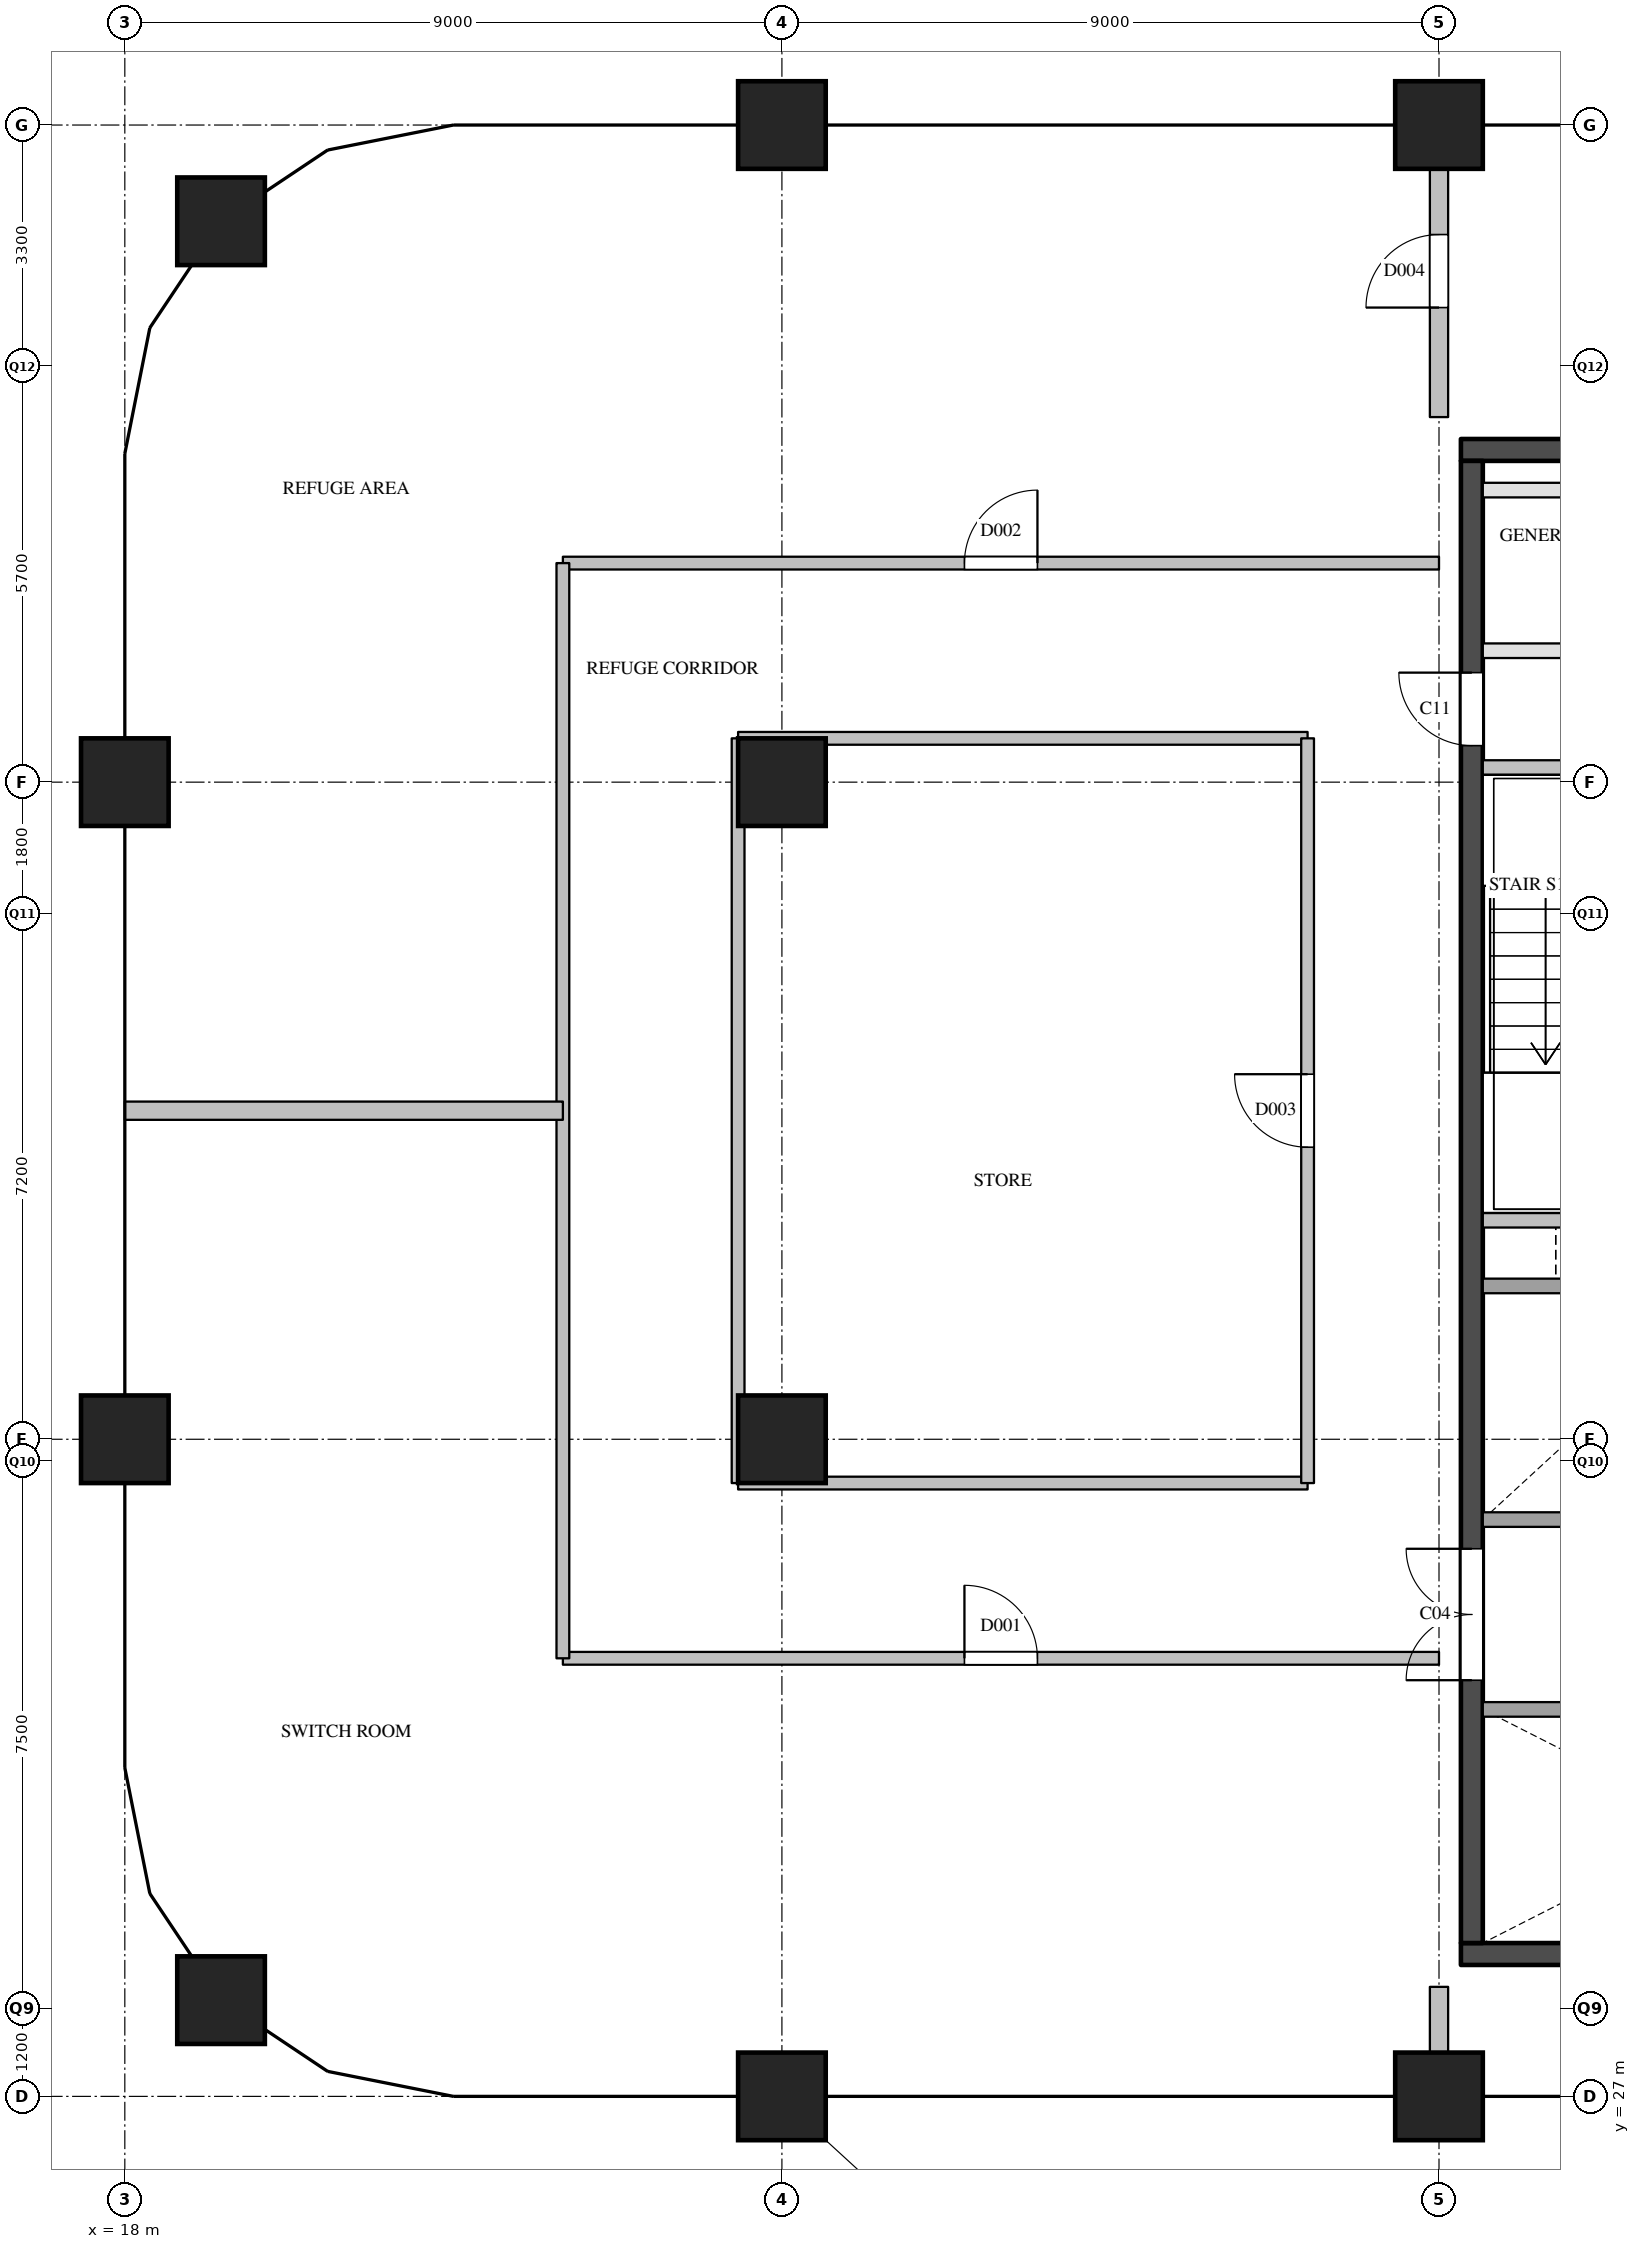
"""IFC4 building model, lengths in metres.
Left out: names, types, materials, properties, quantities, classifications, styles, units other than length and angle.
Written with IfcOpenShell. Run it as: python <this file> out.ifc"""

import sys

from ifc_helpers import new_model, si_unit, direction, frame, frame_2d, origin, origin_2d, place, context, subcontext, project, spatial, rectangle, extrude, element, fill, save


model = new_model("IFC4")
c1 = context("Model", 3, precision=1e-05, world=origin(), true_north=direction((0.0, 1.0)))
c2 = subcontext(c1, "Body", "Model", "MODEL_VIEW")
j1 = project(units=[si_unit("LENGTHUNIT", "METRE"), si_unit("PLANEANGLEUNIT", "RADIAN")], contexts=[c1])
p1 = place(None, origin())
s1 = spatial("IfcSite", under=j1, at=p1, CompositionType="ELEMENT")
p2 = place(p1, origin())
s2 = spatial("IfcBuilding", under=s1, at=p2, CompositionType="ELEMENT")
p3 = place(p2, frame((0.0, 0.0, 295.2)))
s3 = spatial("IfcBuildingStorey", under=s2, at=p3, CompositionType="ELEMENT", Elevation=295.2)
for number, where, z_axis, x_axis in (
    (1, (19.318, 28.318, 0.0), (0.0, 0.0, 1.0), (1.0, 0.0, 0.0)),
    (2, (18.0, 36.0, 0.0), (0.0, 0.0, 1.0), (1.0, 0.0, 0.0)),
    (3, (18.0, 45.0, 0.0), (0.0, 0.0, 1.0), (1.0, 0.0, 0.0)),
    (4, (19.318, 52.682, 0.0), (0.0, 0.0, 1.0), (1.0, 0.0, 0.0)),
    (5, (27.0, 27.0, 0.0), (0.0, 0.0, 1.0), (1.0, 0.0, 0.0)),
    (6, (27.0, 36.0, 0.0), (0.0, 0.0, 1.0), (1.0, 0.0, 0.0)),
    (7, (27.0, 45.0, 0.0), (0.0, 0.0, 1.0), (1.0, 0.0, 0.0)),
    (8, (27.0, 54.0, 0.0), (0.0, 0.0, 1.0), (1.0, 0.0, 0.0)),
    (9, (36.0, 27.0, 0.0), (0.0, 0.0, 1.0), (1.0, 0.0, 0.0)),
    (10, (36.0, 54.0, 0.0), (0.0, 0.0, 1.0), (1.0, 0.0, 0.0)),
):
    element("IfcColumn", number, at=place(p3, frame(where, z_axis=z_axis, x_axis=x_axis)), inside=s3, PredefinedType="COLUMN", context=c2, shape_type="SweptSolid", body=[
        extrude(rectangle(XDim=1.2, YDim=1.2, at=origin_2d()), origin(), (0.0, 0.0, 1.0), 6.0),
    ])
for number, where, z_axis, x_axis in (
    (11, (36.3, 28.95, 0.0), (0.0, 0.0, 1.0), (1.0, 0.0, 0.0)),
    (12, (36.3, 49.55, 0.0), (0.0, 0.0, 1.0), (1.0, 0.0, 0.0)),
):
    element("IfcWall", number, at=place(p3, frame(where, z_axis=z_axis, x_axis=x_axis)), inside=s3, PredefinedType="SHEAR", context=c2, shape_type="SweptSolid", body=[
        extrude(rectangle(XDim=11.8, YDim=0.3, at=frame_2d((5.9, 0.0))), origin(), (0.0, 0.0, 1.0), 5.7),
    ])
p4 = place(p3, frame((36.45, 29.1, 0.0), z_axis=(0.0, 0.0, 1.0), x_axis=(0.0, 1.0, 0.0)))
e13 = element("IfcWall", 13, at=p4, inside=s3, PredefinedType="SHEAR", context=c2, shape_type="SweptSolid", body=[
    extrude(rectangle(XDim=20.3, YDim=0.3, at=frame_2d((10.15, 0.0))), origin(), (0.0, 0.0, 1.0), 5.7),
])
p5 = place(p4, frame((3.6, 0.0, 0.0)))
e14 = element("IfcOpeningElement", 14, at=p5, cuts=e13, PredefinedType="OPENING", context=c2, shape_type="SweptSolid", body=[
    extrude(rectangle(XDim=1.8, YDim=2.1, at=frame_2d((0.9, 1.05))), frame((0.0, 0.16, 0.0), z_axis=(0.0, -1.0, 0.0), x_axis=(1.0, 0.0, 0.0)), (0.0, 0.0, 1.0), 0.32),
])
p6 = place(p4, frame((16.4, 0.0, 0.0)))
e15 = element("IfcOpeningElement", 15, at=p6, cuts=e13, PredefinedType="OPENING", context=c2, shape_type="SweptSolid", body=[
    extrude(rectangle(XDim=1.0, YDim=2.1, at=frame_2d((0.5, 1.05))), frame((0.0, 0.16, 0.0), z_axis=(0.0, -1.0, 0.0), x_axis=(1.0, 0.0, 0.0)), (0.0, 0.0, 1.0), 0.32),
])
p7 = place(p3, frame((36.6, 32.3, 0.0), z_axis=(0.0, 0.0, 1.0), x_axis=(1.0, 0.0, 0.0)))
e16 = element("IfcWall", 16, at=p7, inside=s3, PredefinedType="SOLIDWALL", context=c2, shape_type="SweptSolid", body=[
    extrude(rectangle(XDim=11.2, YDim=0.2, at=frame_2d((5.6, 0.0))), origin(), (0.0, 0.0, 1.0), 5.7),
])
p8 = place(p7, frame((7.225, 0.0, 0.0)))
e17 = element("IfcOpeningElement", 17, at=p8, cuts=e16, PredefinedType="OPENING", context=c2, shape_type="SweptSolid", body=[
    extrude(rectangle(XDim=1.2, YDim=2.1, at=frame_2d((0.6, 1.05))), frame((0.0, 0.11, 0.0), z_axis=(0.0, -1.0, 0.0), x_axis=(1.0, 0.0, 0.0)), (0.0, 0.0, 1.0), 0.22),
])
p9 = place(p7, frame((9.475, 0.0, 0.0)))
e18 = element("IfcOpeningElement", 18, at=p9, cuts=e16, PredefinedType="OPENING", context=c2, shape_type="SweptSolid", body=[
    extrude(rectangle(XDim=1.2, YDim=2.1, at=frame_2d((0.6, 1.05))), frame((0.0, 0.11, 0.0), z_axis=(0.0, -1.0, 0.0), x_axis=(1.0, 0.0, 0.0)), (0.0, 0.0, 1.0), 0.22),
])
p10 = place(p3, frame((36.6, 34.9, 0.0), z_axis=(0.0, 0.0, 1.0), x_axis=(1.0, 0.0, 0.0)))
e19 = element("IfcWall", 19, at=p10, inside=s3, PredefinedType="SOLIDWALL", context=c2, shape_type="SweptSolid", body=[
    extrude(rectangle(XDim=6.3, YDim=0.2, at=frame_2d((3.15, 0.0))), origin(), (0.0, 0.0, 1.0), 5.7),
])
p11 = place(p3, frame((36.6, 38.1, 0.0), z_axis=(0.0, 0.0, 1.0), x_axis=(1.0, 0.0, 0.0)))
e20 = element("IfcWall", 20, at=p11, inside=s3, PredefinedType="SOLIDWALL", context=c2, shape_type="SweptSolid", body=[
    extrude(rectangle(XDim=6.7, YDim=0.2, at=frame_2d((3.35, 0.0))), origin(), (0.0, 0.0, 1.0), 5.7),
])
p12 = place(p3, frame((36.6, 39.0, 0.0), z_axis=(0.0, 0.0, 1.0), x_axis=(1.0, 0.0, 0.0)))
e21 = element("IfcWall", 21, at=p12, inside=s3, PredefinedType="SOLIDWALL", context=c2, shape_type="SweptSolid", body=[
    extrude(rectangle(XDim=3.25, YDim=0.2, at=frame_2d((1.625, 0.0))), origin(), (0.0, 0.0, 1.0), 5.7),
])
p13 = place(p3, frame((36.6, 45.2, 0.0), z_axis=(0.0, 0.0, 1.0), x_axis=(1.0, 0.0, 0.0)))
e22 = element("IfcWall", 22, at=p13, inside=s3, PredefinedType="SOLIDWALL", context=c2, shape_type="SweptSolid", body=[
    extrude(rectangle(XDim=3.25, YDim=0.2, at=frame_2d((1.625, 0.0))), origin(), (0.0, 0.0, 1.0), 5.7),
])
p14 = place(p13, frame((1.125, 0.0, 0.0)))
e23 = element("IfcOpeningElement", 23, at=p14, cuts=e22, PredefinedType="OPENING", context=c2, shape_type="SweptSolid", body=[
    extrude(rectangle(XDim=1.1, YDim=2.1, at=frame_2d((0.55, 1.05))), frame((0.0, 0.11, 0.0), z_axis=(0.0, -1.0, 0.0), x_axis=(1.0, 0.0, 0.0)), (0.0, 0.0, 1.0), 0.22),
])
p15 = place(p3, frame((36.6, 46.8, 0.0), z_axis=(0.0, 0.0, 1.0), x_axis=(1.0, 0.0, 0.0)))
e24 = element("IfcWall", 24, at=p15, inside=s3, PredefinedType="PARTITIONING", context=c2, shape_type="SweptSolid", body=[
    extrude(rectangle(XDim=11.2, YDim=0.2, at=frame_2d((5.6, 0.0))), origin(), (0.0, 0.0, 1.0), 5.7),
])
p16 = place(p15, frame((1.77, 0.0, 0.0)))
e25 = element("IfcOpeningElement", 25, at=p16, cuts=e24, PredefinedType="OPENING", context=c2, shape_type="SweptSolid", body=[
    extrude(rectangle(XDim=1.5, YDim=2.1, at=frame_2d((0.75, 1.05))), frame((0.0, 0.11, 0.0), z_axis=(0.0, -1.0, 0.0), x_axis=(1.0, 0.0, 0.0)), (0.0, 0.0, 1.0), 0.22),
])
p17 = place(p15, frame((7.37, 0.0, 0.0)))
e26 = element("IfcOpeningElement", 26, at=p17, cuts=e24, PredefinedType="OPENING", context=c2, shape_type="SweptSolid", body=[
    extrude(rectangle(XDim=1.5, YDim=2.1, at=frame_2d((0.75, 1.05))), frame((0.0, 0.11, 0.0), z_axis=(0.0, -1.0, 0.0), x_axis=(1.0, 0.0, 0.0)), (0.0, 0.0, 1.0), 0.22),
])
p18 = place(p3, frame((36.6, 49.0, 0.0), z_axis=(0.0, 0.0, 1.0), x_axis=(1.0, 0.0, 0.0)))
e27 = element("IfcWall", 27, at=p18, inside=s3, PredefinedType="PARTITIONING", context=c2, shape_type="SweptSolid", body=[
    extrude(rectangle(XDim=11.2, YDim=0.2, at=frame_2d((5.6, 0.0))), origin(), (0.0, 0.0, 1.0), 5.7),
])
p19 = place(p3, frame((24.0, 33.0, 0.0), z_axis=(0.0, 0.0, 1.0), x_axis=(1.0, 0.0, 0.0)))
e28 = element("IfcWall", 28, at=p19, inside=s3, PredefinedType="PARTITIONING", context=c2, shape_type="SweptSolid", body=[
    extrude(rectangle(XDim=12.0, YDim=0.175, at=frame_2d((6.0, 0.0))), origin(), (0.0, 0.0, 1.0), 5.7),
])
p20 = place(p19, frame((5.5, 0.0, 0.0)))
e29 = element("IfcOpeningElement", 29, at=p20, cuts=e28, PredefinedType="OPENING", context=c2, shape_type="SweptSolid", body=[
    extrude(rectangle(XDim=1.0, YDim=2.1, at=frame_2d((0.5, 1.05))), frame((0.0, 0.097, 0.0), z_axis=(0.0, -1.0, 0.0), x_axis=(1.0, 0.0, 0.0)), (0.0, 0.0, 1.0), 0.195),
])
for number, where, z_axis, x_axis in (
    (30, (26.4, 35.4, 0.0), (0.0, 0.0, 1.0), (1.0, 0.0, 0.0)),
    (31, (26.4, 45.6, 0.0), (0.0, 0.0, 1.0), (1.0, 0.0, 0.0)),
):
    element("IfcWall", number, at=place(p3, frame(where, z_axis=z_axis, x_axis=x_axis)), inside=s3, PredefinedType="PARTITIONING", context=c2, shape_type="SweptSolid", body=[
        extrude(rectangle(XDim=7.8, YDim=0.175, at=frame_2d((3.9, 0.0))), origin(), (0.0, 0.0, 1.0), 5.7),
    ])
p21 = place(p3, frame((24.0, 48.0, 0.0), z_axis=(0.0, 0.0, 1.0), x_axis=(1.0, 0.0, 0.0)))
e32 = element("IfcWall", 32, at=p21, inside=s3, PredefinedType="PARTITIONING", context=c2, shape_type="SweptSolid", body=[
    extrude(rectangle(XDim=12.0, YDim=0.175, at=frame_2d((6.0, 0.0))), origin(), (0.0, 0.0, 1.0), 5.7),
])
p22 = place(p21, frame((5.5, 0.0, 0.0)))
e33 = element("IfcOpeningElement", 33, at=p22, cuts=e32, PredefinedType="OPENING", context=c2, shape_type="SweptSolid", body=[
    extrude(rectangle(XDim=1.0, YDim=2.1, at=frame_2d((0.5, 1.05))), frame((0.0, 0.097, 0.0), z_axis=(0.0, -1.0, 0.0), x_axis=(1.0, 0.0, 0.0)), (0.0, 0.0, 1.0), 0.195),
])
p23 = place(p3, frame((24.0, 33.0, 0.0), z_axis=(0.0, 0.0, 1.0), x_axis=(0.0, 1.0, 0.0)))
e34 = element("IfcWall", 34, at=p23, inside=s3, PredefinedType="PARTITIONING", context=c2, shape_type="SweptSolid", body=[
    extrude(rectangle(XDim=15.0, YDim=0.175, at=frame_2d((7.5, 0.0))), origin(), (0.0, 0.0, 1.0), 5.7),
])
p24 = place(p3, frame((26.4, 35.4, 0.0), z_axis=(0.0, 0.0, 1.0), x_axis=(0.0, 1.0, 0.0)))
e35 = element("IfcWall", 35, at=p24, inside=s3, PredefinedType="PARTITIONING", context=c2, shape_type="SweptSolid", body=[
    extrude(rectangle(XDim=10.2, YDim=0.175, at=frame_2d((5.1, 0.0))), origin(), (0.0, 0.0, 1.0), 5.7),
])
p25 = place(p3, frame((34.2, 35.4, 0.0), z_axis=(0.0, 0.0, 1.0), x_axis=(0.0, 1.0, 0.0)))
e36 = element("IfcWall", 36, at=p25, inside=s3, PredefinedType="PARTITIONING", context=c2, shape_type="SweptSolid", body=[
    extrude(rectangle(XDim=10.2, YDim=0.175, at=frame_2d((5.1, 0.0))), origin(), (0.0, 0.0, 1.0), 5.7),
])
p26 = place(p25, frame((4.6, 0.0, 0.0)))
e37 = element("IfcOpeningElement", 37, at=p26, cuts=e36, PredefinedType="OPENING", context=c2, shape_type="SweptSolid", body=[
    extrude(rectangle(XDim=1.0, YDim=2.1, at=frame_2d((0.5, 1.05))), frame((0.0, 0.097, 0.0), z_axis=(0.0, -1.0, 0.0), x_axis=(1.0, 0.0, 0.0)), (0.0, 0.0, 1.0), 0.195),
])
p27 = place(p3, frame((18.0, 40.5, 0.0), z_axis=(0.0, 0.0, 1.0), x_axis=(1.0, 0.0, 0.0)))
e38 = element("IfcWall", 38, at=p27, inside=s3, PredefinedType="PARTITIONING", context=c2, shape_type="SweptSolid", body=[
    extrude(rectangle(XDim=6.0, YDim=0.25, at=frame_2d((3.0, 0.0))), origin(), (0.0, 0.0, 1.0), 5.7),
])
p28 = place(p3, frame((36.0, 27.0, 0.0), z_axis=(0.0, 0.0, 1.0), x_axis=(0.0, 1.0, 0.0)))
e39 = element("IfcWall", 39, at=p28, inside=s3, PredefinedType="PARTITIONING", context=c2, shape_type="SweptSolid", body=[
    extrude(rectangle(XDim=1.5, YDim=0.25, at=frame_2d((0.75, 0.0))), origin(), (0.0, 0.0, 1.0), 5.7),
])
p29 = place(p3, frame((36.0, 50.0, 0.0), z_axis=(0.0, 0.0, 1.0), x_axis=(0.0, 1.0, 0.0)))
e40 = element("IfcWall", 40, at=p29, inside=s3, PredefinedType="PARTITIONING", context=c2, shape_type="SweptSolid", body=[
    extrude(rectangle(XDim=4.0, YDim=0.25, at=frame_2d((2.0, 0.0))), origin(), (0.0, 0.0, 1.0), 5.7),
])
p30 = place(p29, frame((1.5, 0.0, 0.0)))
e41 = element("IfcOpeningElement", 41, at=p30, cuts=e40, PredefinedType="OPENING", context=c2, shape_type="SweptSolid", body=[
    extrude(rectangle(XDim=1.0, YDim=2.1, at=frame_2d((0.5, 1.05))), frame((0.0, 0.135, 0.0), z_axis=(0.0, -1.0, 0.0), x_axis=(1.0, 0.0, 0.0)), (0.0, 0.0, 1.0), 0.27),
])
p31 = place(p5, origin())
e42 = element("IfcDoor", 42, at=p31, inside=s3, OperationType="DOUBLE_DOOR_SINGLE_SWING", PredefinedType="DOOR", context=c2, shape_type="SweptSolid", body=[
    extrude(rectangle(XDim=1.8, YDim=2.1, at=frame_2d((0.9, 1.05))), frame((0.0, 0.025, 0.0), z_axis=(0.0, -1.0, 0.0), x_axis=(1.0, 0.0, 0.0)), (0.0, 0.0, 1.0), 0.05),
])
fill(e14, e42)
p32 = place(p6, origin())
e43 = element("IfcDoor", 43, at=p32, inside=s3, OperationType="SINGLE_SWING_RIGHT", PredefinedType="DOOR", context=c2, shape_type="SweptSolid", body=[
    extrude(rectangle(XDim=1.0, YDim=2.1, at=frame_2d((0.5, 1.05))), frame((0.0, 0.025, 0.0), z_axis=(0.0, -1.0, 0.0), x_axis=(1.0, 0.0, 0.0)), (0.0, 0.0, 1.0), 0.05),
])
fill(e15, e43)
p33 = place(p20, origin())
e44 = element("IfcDoor", 44, at=p33, inside=s3, OperationType="SINGLE_SWING_LEFT", PredefinedType="DOOR", context=c2, shape_type="SweptSolid", body=[
    extrude(rectangle(XDim=1.0, YDim=2.1, at=frame_2d((0.5, 1.05))), frame((0.0, 0.025, 0.0), z_axis=(0.0, -1.0, 0.0), x_axis=(1.0, 0.0, 0.0)), (0.0, 0.0, 1.0), 0.05),
])
fill(e29, e44)
p34 = place(p22, origin())
e45 = element("IfcDoor", 45, at=p34, inside=s3, OperationType="SINGLE_SWING_RIGHT", PredefinedType="DOOR", context=c2, shape_type="SweptSolid", body=[
    extrude(rectangle(XDim=1.0, YDim=2.1, at=frame_2d((0.5, 1.05))), frame((0.0, 0.025, 0.0), z_axis=(0.0, -1.0, 0.0), x_axis=(1.0, 0.0, 0.0)), (0.0, 0.0, 1.0), 0.05),
])
fill(e33, e45)
p35 = place(p26, origin())
e46 = element("IfcDoor", 46, at=p35, inside=s3, OperationType="SINGLE_SWING_RIGHT", PredefinedType="DOOR", context=c2, shape_type="SweptSolid", body=[
    extrude(rectangle(XDim=1.0, YDim=2.1, at=frame_2d((0.5, 1.05))), frame((0.0, 0.025, 0.0), z_axis=(0.0, -1.0, 0.0), x_axis=(1.0, 0.0, 0.0)), (0.0, 0.0, 1.0), 0.05),
])
fill(e37, e46)
p36 = place(p30, origin())
e47 = element("IfcDoor", 47, at=p36, inside=s3, OperationType="SINGLE_SWING_LEFT", PredefinedType="DOOR", context=c2, shape_type="SweptSolid", body=[
    extrude(rectangle(XDim=1.0, YDim=2.1, at=frame_2d((0.5, 1.05))), frame((0.0, 0.025, 0.0), z_axis=(0.0, -1.0, 0.0), x_axis=(1.0, 0.0, 0.0)), (0.0, 0.0, 1.0), 0.05),
])
fill(e41, e47)
save(model, sys.argv[1])
